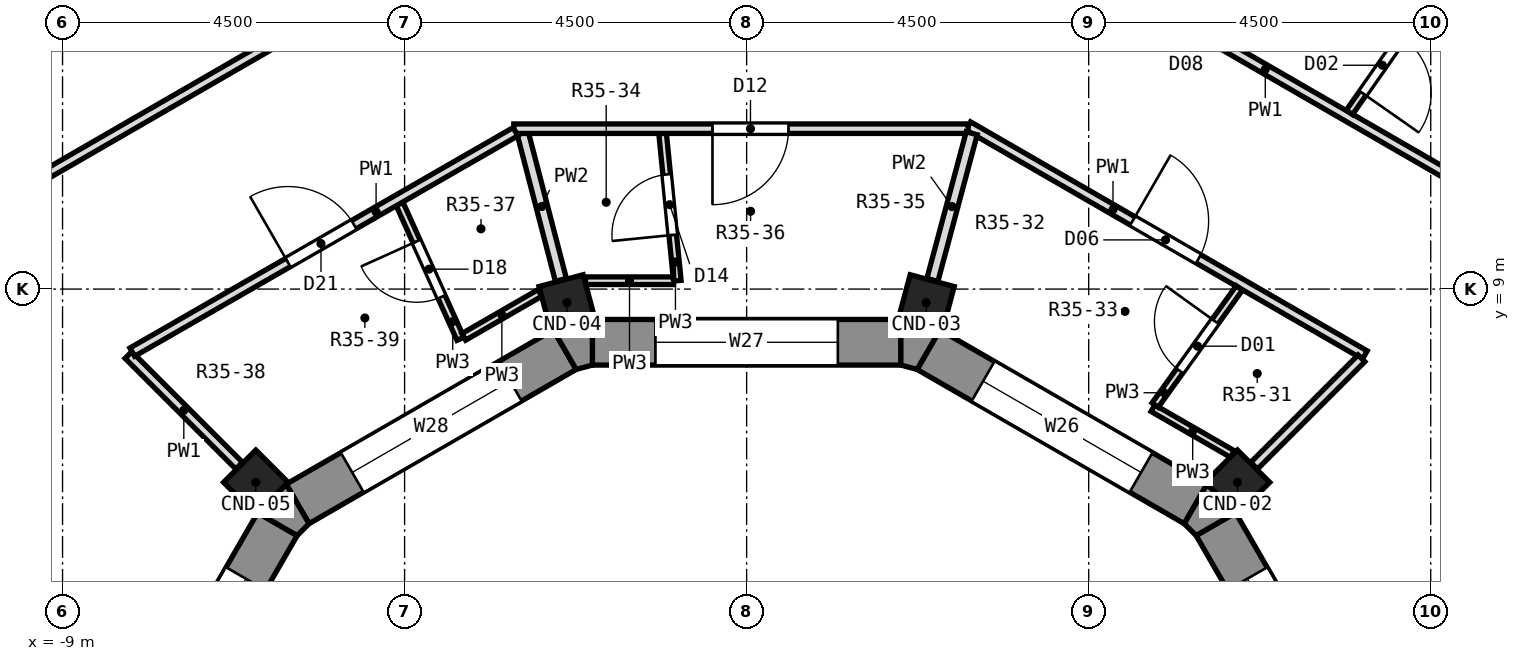
"""IFC4 building model, lengths in metres.
Left out: names, types, materials, properties, quantities, classifications, styles, units other than length and angle.
Written with IfcOpenShell. Run it as: python <this file> out.ifc"""

import sys

from ifc_helpers import new_model, si_unit, direction, frame, frame_2d, origin, origin_2d, place, context, subcontext, project, spatial, polyline, rectangle, outline, extrude, element, fill, save


model = new_model("IFC4")
c1 = context("Model", 3, precision=1e-05, world=origin(), true_north=direction((0.0, 1.0)))
c2 = subcontext(c1, "Body", "Model", "MODEL_VIEW")
j1 = project(units=[si_unit("LENGTHUNIT", "METRE"), si_unit("PLANEANGLEUNIT", "RADIAN")], contexts=[c1])
p1 = place(None, origin())
s1 = spatial("IfcSite", under=j1, at=p1, CompositionType="ELEMENT")
p2 = place(p1, origin())
s2 = spatial("IfcBuilding", under=s1, at=p2, CompositionType="ELEMENT")
p3 = place(p2, frame((0.0, 0.0, 249.5)))
s3 = spatial("IfcBuildingStorey", under=s2, at=p3, CompositionType="ELEMENT", Elevation=249.5)
for number, where, z_axis, x_axis in (
    (1, (6.458, 6.458, 0.0), (0.0, 0.0, 1.0), (0.707, 0.707, 0.0)),
    (2, (2.364, 8.821, 0.0), (0.0, 0.0, 1.0), (0.259, 0.966, 0.0)),
    (3, (-2.364, 8.821, 0.0), (0.0, 0.0, 1.0), (-0.259, 0.966, 0.0)),
    (4, (-6.458, 6.458, 0.0), (0.0, 0.0, 1.0), (-0.707, 0.707, 0.0)),
):
    element("IfcColumn", number, at=place(p3, frame(where, z_axis=z_axis, x_axis=x_axis)), inside=s3, PredefinedType="COLUMN", context=c2, shape_type="SweptSolid", body=[
        extrude(rectangle(XDim=0.6, YDim=0.6, at=origin_2d()), origin(), (0.0, 0.0, 1.0), 3.3),
    ])
p4 = place(p3, frame((8.203, 2.393, 0.0), z_axis=(0.0, 0.0, 1.0), x_axis=(-0.499994954979, 0.866028316509, 0.0)))
e5 = element("IfcWall", 5, at=p4, inside=s3, PredefinedType="SOLIDWALL", context=c2, shape_type="SweptSolid", body=[
    extrude(rectangle(XDim=4.059, YDim=0.6, at=frame_2d((2.029, 0.0))), origin(), (0.0, 0.0, 1.0), 2.9),
])
p5 = place(p4, frame((0.829, 0.0, 0.9)))
e6 = element("IfcOpeningElement", 6, at=p5, cuts=e5, PredefinedType="OPENING", context=c2, shape_type="SweptSolid", body=[
    extrude(rectangle(XDim=2.4, YDim=1.8, at=frame_2d((1.2, 0.9))), frame((0.0, 0.312, 0.0), z_axis=(0.0, -1.0, 0.0), x_axis=(1.0, 0.0, 0.0)), (0.0, 0.0, 1.0), 0.624),
])
p6 = place(p3, frame((5.907, 6.173, 0.0), z_axis=(0.0, 0.0, 1.0), x_axis=(-0.866028316509, 0.499994954979, 0.0)))
e7 = element("IfcWall", 7, at=p6, inside=s3, PredefinedType="SOLIDWALL", context=c2, shape_type="SweptSolid", body=[
    extrude(rectangle(XDim=4.059, YDim=0.6, at=frame_2d((2.029, 0.0))), origin(), (0.0, 0.0, 1.0), 2.9),
])
p7 = place(p6, frame((0.829, 0.0, 0.9)))
e8 = element("IfcOpeningElement", 8, at=p7, cuts=e7, PredefinedType="OPENING", context=c2, shape_type="SweptSolid", body=[
    extrude(rectangle(XDim=2.4, YDim=1.8, at=frame_2d((1.2, 0.9))), frame((0.0, 0.312, 0.0), z_axis=(0.0, -1.0, 0.0), x_axis=(1.0, 0.0, 0.0)), (0.0, 0.0, 1.0), 0.624),
])
p8 = place(p3, frame((2.029, 8.3, 0.0), z_axis=(0.0, 0.0, 1.0), x_axis=(-1.0, 0.0, 0.0)))
e9 = element("IfcWall", 9, at=p8, inside=s3, PredefinedType="SOLIDWALL", context=c2, shape_type="SweptSolid", body=[
    extrude(rectangle(XDim=4.059, YDim=0.6, at=frame_2d((2.029, 0.0))), origin(), (0.0, 0.0, 1.0), 2.9),
])
p9 = place(p8, frame((0.829, 0.0, 0.9)))
e10 = element("IfcOpeningElement", 10, at=p9, cuts=e9, PredefinedType="OPENING", context=c2, shape_type="SweptSolid", body=[
    extrude(rectangle(XDim=2.4, YDim=1.8, at=frame_2d((1.2, 0.9))), frame((0.0, 0.312, 0.0), z_axis=(0.0, -1.0, 0.0), x_axis=(1.0, 0.0, 0.0)), (0.0, 0.0, 1.0), 0.624),
])
p10 = place(p3, frame((-2.393, 8.203, 0.0), z_axis=(0.0, 0.0, 1.0), x_axis=(-0.866028316509, -0.499994954979, 0.0)))
e11 = element("IfcWall", 11, at=p10, inside=s3, PredefinedType="SOLIDWALL", context=c2, shape_type="SweptSolid", body=[
    extrude(rectangle(XDim=4.059, YDim=0.6, at=frame_2d((2.029, 0.0))), origin(), (0.0, 0.0, 1.0), 2.9),
])
p11 = place(p10, frame((0.829, 0.0, 0.9)))
e12 = element("IfcOpeningElement", 12, at=p11, cuts=e11, PredefinedType="OPENING", context=c2, shape_type="SweptSolid", body=[
    extrude(rectangle(XDim=2.4, YDim=1.8, at=frame_2d((1.2, 0.9))), frame((0.0, 0.312, 0.0), z_axis=(0.0, -1.0, 0.0), x_axis=(1.0, 0.0, 0.0)), (0.0, 0.0, 1.0), 0.624),
])
p12 = place(p3, frame((-6.173, 5.907, 0.0), z_axis=(0.0, 0.0, 1.0), x_axis=(-0.499994954979, -0.866028316509, 0.0)))
e13 = element("IfcWall", 13, at=p12, inside=s3, PredefinedType="SOLIDWALL", context=c2, shape_type="SweptSolid", body=[
    extrude(rectangle(XDim=4.059, YDim=0.6, at=frame_2d((2.029, 0.0))), origin(), (0.0, 0.0, 1.0), 2.9),
])
p13 = place(p12, frame((0.829, 0.0, 0.9)))
e14 = element("IfcOpeningElement", 14, at=p13, cuts=e13, PredefinedType="OPENING", context=c2, shape_type="SweptSolid", body=[
    extrude(rectangle(XDim=2.4, YDim=1.8, at=frame_2d((1.2, 0.9))), frame((0.0, 0.312, 0.0), z_axis=(0.0, -1.0, 0.0), x_axis=(1.0, 0.0, 0.0)), (0.0, 0.0, 1.0), 0.624),
])
p14 = place(p3, origin())
e15 = element("IfcWall", 15, at=p14, inside=s3, PredefinedType="SOLIDWALL", context=c2, shape_type="SweptSolid", body=[
    extrude(outline(polyline([(6.058, 6.433), (5.758, 5.914), (5.914, 5.758), (6.433, 6.058), (6.058, 6.433)])), origin(), (0.0, 0.0, 1.0), 2.9),
])
p15 = place(p3, origin())
e16 = element("IfcWall", 16, at=p15, inside=s3, PredefinedType="SOLIDWALL", context=c2, shape_type="SweptSolid", body=[
    extrude(outline(polyline([(2.029, 8.6), (2.029, 8.0), (2.242, 7.943), (2.542, 8.462), (2.029, 8.6)])), origin(), (0.0, 0.0, 1.0), 2.9),
])
p16 = place(p3, origin())
e17 = element("IfcWall", 17, at=p16, inside=s3, PredefinedType="SOLIDWALL", context=c2, shape_type="SweptSolid", body=[
    extrude(outline(polyline([(-2.542, 8.462), (-2.242, 7.943), (-2.029, 8.0), (-2.029, 8.6), (-2.542, 8.462)])), origin(), (0.0, 0.0, 1.0), 2.9),
])
p17 = place(p3, origin())
e18 = element("IfcWall", 18, at=p17, inside=s3, PredefinedType="SOLIDWALL", context=c2, shape_type="SweptSolid", body=[
    extrude(outline(polyline([(-6.433, 6.058), (-5.914, 5.758), (-5.758, 5.914), (-6.058, 6.433), (-6.433, 6.058)])), origin(), (0.0, 0.0, 1.0), 2.9),
])
p18 = place(p3, frame((-1.106, 11.048, 0.0), z_axis=(0.0, 0.0, 1.0), x_axis=(0.099416829924, -0.995045875288, 0.0)))
e19 = element("IfcWall", 19, at=p18, inside=s3, PredefinedType="PARTITIONING", context=c2, shape_type="SweptSolid", body=[
    extrude(rectangle(XDim=1.948, YDim=0.1, at=frame_2d((0.974, 0.0))), origin(), (0.0, 0.0, 1.0), 2.9),
])
p19 = place(p18, frame((0.542, 0.0, 0.0)))
e20 = element("IfcOpeningElement", 20, at=p19, cuts=e19, PredefinedType="OPENING", context=c2, shape_type="SweptSolid", body=[
    extrude(rectangle(XDim=0.8, YDim=2.1, at=frame_2d((0.4, 1.05))), frame((0.0, 0.062, 0.0), z_axis=(0.0, -1.0, 0.0), x_axis=(1.0, 0.0, 0.0)), (0.0, 0.0, 1.0), 0.124),
])
p20 = place(p3, frame((-2.946, 11.053, 0.0), z_axis=(0.0, 0.0, 1.0), x_axis=(0.251585758505, -0.96783500976, 0.0)))
e21 = element("IfcWall", 21, at=p20, inside=s3, PredefinedType="PARTITIONING", context=c2, shape_type="SweptSolid", body=[
    extrude(rectangle(XDim=1.997, YDim=0.15, at=frame_2d((0.999, 0.0))), origin(), (0.0, 0.0, 1.0), 2.9),
])
p21 = place(p3, frame((-4.566, 10.121, 0.0), z_axis=(0.0, 0.0, 1.0), x_axis=(0.411506094415, -0.911407008015, 0.0)))
e22 = element("IfcWall", 22, at=p21, inside=s3, PredefinedType="PARTITIONING", context=c2, shape_type="SweptSolid", body=[
    extrude(rectangle(XDim=1.947, YDim=0.1, at=frame_2d((0.974, 0.0))), origin(), (0.0, 0.0, 1.0), 2.9),
])
p22 = place(p21, frame((0.542, 0.0, 0.0)))
e23 = element("IfcOpeningElement", 23, at=p22, cuts=e22, PredefinedType="OPENING", context=c2, shape_type="SweptSolid", body=[
    extrude(rectangle(XDim=0.8, YDim=2.1, at=frame_2d((0.4, 1.05))), frame((0.0, 0.062, 0.0), z_axis=(0.0, -1.0, 0.0), x_axis=(1.0, 0.0, 0.0)), (0.0, 0.0, 1.0), 0.124),
])
p23 = place(p3, frame((-8.133, 8.133, 0.0), z_axis=(0.0, 0.0, 1.0), x_axis=(0.707106781187, -0.707106781187, 0.0)))
e24 = element("IfcWall", 24, at=p23, inside=s3, PredefinedType="PARTITIONING", context=c2, shape_type="SweptSolid", body=[
    extrude(rectangle(XDim=2.06, YDim=0.125, at=frame_2d((1.03, 0.0))), origin(), (0.0, 0.0, 1.0), 2.9),
])
p24 = place(p3, frame((5.345, 7.433, 0.0), z_axis=(0.0, 0.0, 1.0), x_axis=(0.866108180176, -0.499856599668, 0.0)))
e25 = element("IfcWall", 25, at=p24, inside=s3, PredefinedType="PARTITIONING", context=c2, shape_type="SweptSolid", body=[
    extrude(rectangle(XDim=1.208, YDim=0.1, at=frame_2d((0.604, 0.0))), origin(), (0.0, 0.0, 1.0), 2.9),
])
p25 = place(p3, frame((2.915, 11.146, 0.0), z_axis=(0.0, 0.0, 1.0), x_axis=(0.866022982797, -0.500004193249, 0.0)))
e26 = element("IfcWall", 26, at=p25, inside=s3, PredefinedType="PARTITIONING", context=c2, shape_type="SweptSolid", body=[
    extrude(rectangle(XDim=6.026, YDim=0.125, at=frame_2d((3.013, 0.0))), origin(), (0.0, 0.0, 1.0), 2.9),
])
p26 = place(p25, frame((2.498, 0.0, 0.0)))
e27 = element("IfcOpeningElement", 27, at=p26, cuts=e26, PredefinedType="OPENING", context=c2, shape_type="SweptSolid", body=[
    extrude(rectangle(XDim=1.0, YDim=2.1, at=frame_2d((0.5, 1.05))), frame((0.0, 0.074, 0.0), z_axis=(0.0, -1.0, 0.0), x_axis=(1.0, 0.0, 0.0)), (0.0, 0.0, 1.0), 0.149),
])
p27 = place(p3, frame((3.611, 13.747, 0.0), z_axis=(0.0, 0.0, 1.0), x_axis=(0.865964194244, -0.500106003051, 0.0)))
e28 = element("IfcWall", 28, at=p27, inside=s3, PredefinedType="PARTITIONING", context=c2, shape_type="SweptSolid", body=[
    extrude(rectangle(XDim=7.42, YDim=0.125, at=frame_2d((3.71, 0.0))), origin(), (0.0, 0.0, 1.0), 2.9),
])
p28 = place(p27, frame((2.007, 0.0, 0.0)))
e29 = element("IfcOpeningElement", 29, at=p28, cuts=e28, PredefinedType="OPENING", context=c2, shape_type="SweptSolid", body=[
    extrude(rectangle(XDim=1.0, YDim=2.1, at=frame_2d((0.5, 1.05))), frame((0.0, 0.074, 0.0), z_axis=(0.0, -1.0, 0.0), x_axis=(1.0, 0.0, 0.0)), (0.0, 0.0, 1.0), 0.149),
])
p29 = place(p3, frame((-2.12, 9.11, 0.0), z_axis=(0.0, 0.0, 1.0), x_axis=(1.0, 0.0, 0.0)))
e30 = element("IfcWall", 30, at=p29, inside=s3, PredefinedType="PARTITIONING", context=c2, shape_type="SweptSolid", body=[
    extrude(rectangle(XDim=1.158, YDim=0.1, at=frame_2d((0.579, 0.0))), origin(), (0.0, 0.0, 1.0), 2.9),
])
p30 = place(p3, frame((-3.063, 11.11, 0.0), z_axis=(0.0, 0.0, 1.0), x_axis=(1.0, 0.0, 0.0)))
e31 = element("IfcWall", 31, at=p30, inside=s3, PredefinedType="PARTITIONING", context=c2, shape_type="SweptSolid", body=[
    extrude(rectangle(XDim=5.978, YDim=0.125, at=frame_2d((2.989, 0.0))), origin(), (0.0, 0.0, 1.0), 2.9),
])
p31 = place(p30, frame((2.614, 0.0, 0.0)))
e32 = element("IfcOpeningElement", 32, at=p31, cuts=e31, PredefinedType="OPENING", context=c2, shape_type="SweptSolid", body=[
    extrude(rectangle(XDim=1.0, YDim=2.1, at=frame_2d((0.5, 1.05))), frame((0.0, 0.074, 0.0), z_axis=(0.0, -1.0, 0.0), x_axis=(1.0, 0.0, 0.0)), (0.0, 0.0, 1.0), 0.149),
])
p32 = place(p3, frame((-8.083, 8.171, 0.0), z_axis=(0.0, 0.0, 1.0), x_axis=(0.866868209522, 0.498537368027, 0.0)))
e33 = element("IfcWall", 33, at=p32, inside=s3, PredefinedType="PARTITIONING", context=c2, shape_type="SweptSolid", body=[
    extrude(rectangle(XDim=5.816, YDim=0.125, at=frame_2d((2.908, 0.0))), origin(), (0.0, 0.0, 1.0), 2.9),
])
p33 = place(p32, frame((2.364, 0.0, 0.0)))
e34 = element("IfcOpeningElement", 34, at=p33, cuts=e33, PredefinedType="OPENING", context=c2, shape_type="SweptSolid", body=[
    extrude(rectangle(XDim=1.0, YDim=2.1, at=frame_2d((0.5, 1.05))), frame((0.0, 0.074, 0.0), z_axis=(0.0, -1.0, 0.0), x_axis=(1.0, 0.0, 0.0)), (0.0, 0.0, 1.0), 0.149),
])
p34 = place(p3, frame((-3.722, 8.371, 0.0), z_axis=(0.0, 0.0, 1.0), x_axis=(0.866132916787, 0.499813735764, 0.0)))
e35 = element("IfcWall", 35, at=p34, inside=s3, PredefinedType="PARTITIONING", context=c2, shape_type="SweptSolid", body=[
    extrude(rectangle(XDim=1.158, YDim=0.1, at=frame_2d((0.579, 0.0))), origin(), (0.0, 0.0, 1.0), 2.9),
])
p35 = place(p3, frame((-9.982, 10.067, 0.0), z_axis=(0.0, 0.0, 1.0), x_axis=(0.865972766561, 0.500091159265, 0.0)))
e36 = element("IfcWall", 36, at=p35, inside=s3, PredefinedType="PARTITIONING", context=c2, shape_type="SweptSolid", body=[
    extrude(rectangle(XDim=7.222, YDim=0.125, at=frame_2d((3.611, 0.0))), origin(), (0.0, 0.0, 1.0), 2.9),
])
p36 = place(p3, frame((6.677, 6.677, 0.0), z_axis=(0.0, 0.0, 1.0), x_axis=(0.707106781187, 0.707106781187, 0.0)))
e37 = element("IfcWall", 37, at=p36, inside=s3, PredefinedType="PARTITIONING", context=c2, shape_type="SweptSolid", body=[
    extrude(rectangle(XDim=1.997, YDim=0.125, at=frame_2d((0.999, 0.0))), origin(), (0.0, 0.0, 1.0), 2.9),
])
p37 = place(p3, frame((5.374, 7.474, 0.0), z_axis=(0.0, 0.0, 1.0), x_axis=(0.583609530889, 0.812034429969, 0.0)))
e38 = element("IfcWall", 38, at=p37, inside=s3, PredefinedType="PARTITIONING", context=c2, shape_type="SweptSolid", body=[
    extrude(rectangle(XDim=1.897, YDim=0.1, at=frame_2d((0.949, 0.0))), origin(), (0.0, 0.0, 1.0), 2.9),
])
p38 = place(p37, frame((0.555, 0.0, 0.0)))
e39 = element("IfcOpeningElement", 39, at=p38, cuts=e38, PredefinedType="OPENING", context=c2, shape_type="SweptSolid", body=[
    extrude(rectangle(XDim=0.8, YDim=2.1, at=frame_2d((0.4, 1.05))), frame((0.0, 0.062, 0.0), z_axis=(0.0, -1.0, 0.0), x_axis=(1.0, 0.0, 0.0)), (0.0, 0.0, 1.0), 0.124),
])
p39 = place(p3, frame((7.93, 11.325, 0.0), z_axis=(0.0, 0.0, 1.0), x_axis=(0.57357434303, 0.819153510044, 0.0)))
e40 = element("IfcWall", 40, at=p39, inside=s3, PredefinedType="PARTITIONING", context=c2, shape_type="SweptSolid", body=[
    extrude(rectangle(XDim=3.803, YDim=0.1, at=frame_2d((1.902, 0.0))), origin(), (0.0, 0.0, 1.0), 2.9),
])
p40 = place(p39, frame((0.306, 0.0, 0.0)))
e41 = element("IfcOpeningElement", 41, at=p40, cuts=e40, PredefinedType="OPENING", context=c2, shape_type="SweptSolid", body=[
    extrude(rectangle(XDim=0.9, YDim=2.1, at=frame_2d((0.45, 1.05))), frame((0.0, 0.062, 0.0), z_axis=(0.0, -1.0, 0.0), x_axis=(1.0, 0.0, 0.0)), (0.0, 0.0, 1.0), 0.124),
])
p41 = place(p39, frame((1.406, 0.0, 0.0)))
e42 = element("IfcOpeningElement", 42, at=p41, cuts=e40, PredefinedType="OPENING", context=c2, shape_type="SweptSolid", body=[
    extrude(rectangle(XDim=0.9, YDim=2.1, at=frame_2d((0.45, 1.05))), frame((0.0, 0.062, 0.0), z_axis=(0.0, -1.0, 0.0), x_axis=(1.0, 0.0, 0.0)), (0.0, 0.0, 1.0), 0.124),
])
p42 = place(p39, frame((2.556, 0.0, 0.0)))
e43 = element("IfcOpeningElement", 43, at=p42, cuts=e40, PredefinedType="OPENING", context=c2, shape_type="SweptSolid", body=[
    extrude(rectangle(XDim=1.0, YDim=2.1, at=frame_2d((0.5, 1.05))), frame((0.0, 0.062, 0.0), z_axis=(0.0, -1.0, 0.0), x_axis=(1.0, 0.0, 0.0)), (0.0, 0.0, 1.0), 0.124),
])
p43 = place(p3, frame((2.444, 9.12, 0.0), z_axis=(0.0, 0.0, 1.0), x_axis=(0.258780892738, 0.965936048377, 0.0)))
e44 = element("IfcWall", 44, at=p43, inside=s3, PredefinedType="PARTITIONING", context=c2, shape_type="SweptSolid", body=[
    extrude(rectangle(XDim=1.997, YDim=0.15, at=frame_2d((0.999, 0.0))), origin(), (0.0, 0.0, 1.0), 2.9),
])
p44 = place(p5, origin())
e45 = element("IfcWindow", 45, at=p44, inside=s3, PartitioningType="SINGLE_PANEL", PredefinedType="WINDOW", context=c2, shape_type="SweptSolid", body=[
    extrude(rectangle(XDim=2.4, YDim=1.8, at=frame_2d((1.2, 0.9))), frame((0.0, -0.12, 0.0), z_axis=(0.0, -1.0, 0.0), x_axis=(1.0, 0.0, 0.0)), (0.0, 0.0, 1.0), 0.06),
])
fill(e6, e45)
p45 = place(p7, origin())
e46 = element("IfcWindow", 46, at=p45, inside=s3, PartitioningType="SINGLE_PANEL", PredefinedType="WINDOW", context=c2, shape_type="SweptSolid", body=[
    extrude(rectangle(XDim=2.4, YDim=1.8, at=frame_2d((1.2, 0.9))), frame((0.0, -0.12, 0.0), z_axis=(0.0, -1.0, 0.0), x_axis=(1.0, 0.0, 0.0)), (0.0, 0.0, 1.0), 0.06),
])
fill(e8, e46)
p46 = place(p9, origin())
e47 = element("IfcWindow", 47, at=p46, inside=s3, PartitioningType="SINGLE_PANEL", PredefinedType="WINDOW", context=c2, shape_type="SweptSolid", body=[
    extrude(rectangle(XDim=2.4, YDim=1.8, at=frame_2d((1.2, 0.9))), frame((0.0, -0.12, 0.0), z_axis=(0.0, -1.0, 0.0), x_axis=(1.0, 0.0, 0.0)), (0.0, 0.0, 1.0), 0.06),
])
fill(e10, e47)
p47 = place(p11, origin())
e48 = element("IfcWindow", 48, at=p47, inside=s3, PartitioningType="SINGLE_PANEL", PredefinedType="WINDOW", context=c2, shape_type="SweptSolid", body=[
    extrude(rectangle(XDim=2.4, YDim=1.8, at=frame_2d((1.2, 0.9))), frame((0.0, -0.12, 0.0), z_axis=(0.0, -1.0, 0.0), x_axis=(1.0, 0.0, 0.0)), (0.0, 0.0, 1.0), 0.06),
])
fill(e12, e48)
p48 = place(p13, origin())
e49 = element("IfcWindow", 49, at=p48, inside=s3, PartitioningType="SINGLE_PANEL", PredefinedType="WINDOW", context=c2, shape_type="SweptSolid", body=[
    extrude(rectangle(XDim=2.4, YDim=1.8, at=frame_2d((1.2, 0.9))), frame((0.0, -0.12, 0.0), z_axis=(0.0, -1.0, 0.0), x_axis=(1.0, 0.0, 0.0)), (0.0, 0.0, 1.0), 0.06),
])
fill(e14, e49)
p49 = place(p38, origin())
e50 = element("IfcDoor", 50, at=p49, inside=s3, OperationType="SINGLE_SWING_RIGHT", PredefinedType="DOOR", context=c2, shape_type="SweptSolid", body=[
    extrude(rectangle(XDim=0.8, YDim=2.1, at=frame_2d((0.4, 1.05))), frame((0.0, 0.025, 0.0), z_axis=(0.0, -1.0, 0.0), x_axis=(1.0, 0.0, 0.0)), (0.0, 0.0, 1.0), 0.05),
])
fill(e39, e50)
p50 = place(p40, frame((0.9, 0.0, 0.0), z_axis=(0.0, 0.0, 1.0), x_axis=(-1.0, 0.0, 0.0)))
e51 = element("IfcDoor", 51, at=p50, inside=s3, OperationType="SINGLE_SWING_RIGHT", PredefinedType="DOOR", context=c2, shape_type="SweptSolid", body=[
    extrude(rectangle(XDim=0.9, YDim=2.1, at=frame_2d((0.45, 1.05))), frame((0.0, 0.025, 0.0), z_axis=(0.0, -1.0, 0.0), x_axis=(1.0, 0.0, 0.0)), (0.0, 0.0, 1.0), 0.05),
])
fill(e41, e51)
p51 = place(p26, origin())
e52 = element("IfcDoor", 52, at=p51, inside=s3, OperationType="SINGLE_SWING_LEFT", PredefinedType="DOOR", context=c2, shape_type="SweptSolid", body=[
    extrude(rectangle(XDim=1.0, YDim=2.1, at=frame_2d((0.5, 1.05))), frame((0.0, 0.025, 0.0), z_axis=(0.0, -1.0, 0.0), x_axis=(1.0, 0.0, 0.0)), (0.0, 0.0, 1.0), 0.05),
])
fill(e27, e52)
p52 = place(p31, frame((1.0, 0.0, 0.0), z_axis=(0.0, 0.0, 1.0), x_axis=(-1.0, 0.0, 0.0)))
e53 = element("IfcDoor", 53, at=p52, inside=s3, OperationType="SINGLE_SWING_RIGHT", PredefinedType="DOOR", context=c2, shape_type="SweptSolid", body=[
    extrude(rectangle(XDim=1.0, YDim=2.1, at=frame_2d((0.5, 1.05))), frame((0.0, 0.025, 0.0), z_axis=(0.0, -1.0, 0.0), x_axis=(1.0, 0.0, 0.0)), (0.0, 0.0, 1.0), 0.05),
])
fill(e32, e53)
p53 = place(p19, frame((0.8, 0.0, 0.0), z_axis=(0.0, 0.0, 1.0), x_axis=(-1.0, 0.0, 0.0)))
e54 = element("IfcDoor", 54, at=p53, inside=s3, OperationType="SINGLE_SWING_LEFT", PredefinedType="DOOR", context=c2, shape_type="SweptSolid", body=[
    extrude(rectangle(XDim=0.8, YDim=2.1, at=frame_2d((0.4, 1.05))), frame((0.0, 0.025, 0.0), z_axis=(0.0, -1.0, 0.0), x_axis=(1.0, 0.0, 0.0)), (0.0, 0.0, 1.0), 0.05),
])
fill(e20, e54)
p54 = place(p22, frame((0.8, 0.0, 0.0), z_axis=(0.0, 0.0, 1.0), x_axis=(-1.0, 0.0, 0.0)))
e55 = element("IfcDoor", 55, at=p54, inside=s3, OperationType="SINGLE_SWING_RIGHT", PredefinedType="DOOR", context=c2, shape_type="SweptSolid", body=[
    extrude(rectangle(XDim=0.8, YDim=2.1, at=frame_2d((0.4, 1.05))), frame((0.0, 0.025, 0.0), z_axis=(0.0, -1.0, 0.0), x_axis=(1.0, 0.0, 0.0)), (0.0, 0.0, 1.0), 0.05),
])
fill(e23, e55)
p55 = place(p33, origin())
e56 = element("IfcDoor", 56, at=p55, inside=s3, OperationType="SINGLE_SWING_LEFT", PredefinedType="DOOR", context=c2, shape_type="SweptSolid", body=[
    extrude(rectangle(XDim=1.0, YDim=2.1, at=frame_2d((0.5, 1.05))), frame((0.0, 0.025, 0.0), z_axis=(0.0, -1.0, 0.0), x_axis=(1.0, 0.0, 0.0)), (0.0, 0.0, 1.0), 0.05),
])
fill(e34, e56)
save(model, sys.argv[1])
